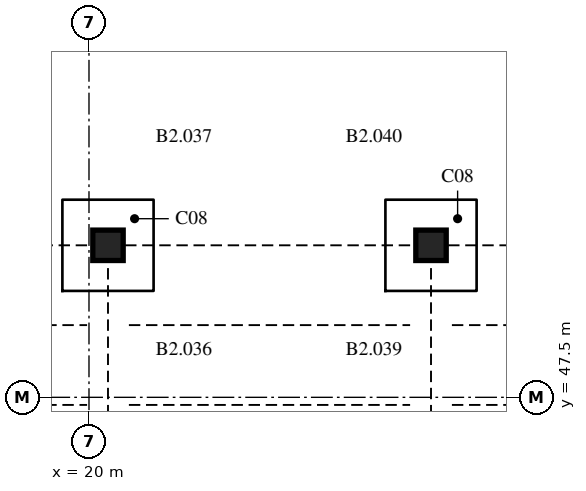
"""IFC4 building model, lengths in metres.
Left out: names, types, materials, properties, quantities, classifications, styles, units other than length and angle.
Written with IfcOpenShell. Run it as: python <this file> out.ifc"""

import sys

from ifc_helpers import new_model, si_unit, direction, frame, origin, origin_2d, place, context, subcontext, project, spatial, rectangle, extrude, element, save


model = new_model("IFC4")
c1 = context("Model", 3, precision=1e-05, world=origin(), true_north=direction((0.0, 1.0)))
c2 = subcontext(c1, "Body", "Model", "MODEL_VIEW")
j1 = project(units=[si_unit("LENGTHUNIT", "METRE"), si_unit("PLANEANGLEUNIT", "RADIAN")], contexts=[c1])
p1 = place(None, origin())
s1 = spatial("IfcSite", under=j1, at=p1, CompositionType="ELEMENT")
p2 = place(p1, origin())
s2 = spatial("IfcBuilding", under=s1, at=p2, CompositionType="ELEMENT")
p3 = place(p2, frame((0.0, 0.0, -7.5)))
s3 = spatial("IfcBuildingStorey", under=s2, at=p3, CompositionType="ELEMENT", Elevation=-7.5)
for number, where, z_axis, x_axis in (
    (1, (20.5, 51.5, -0.6), (0.0, 0.0, 1.0), (1.0, 0.0, 0.0)),
    (2, (29.0, 51.5, -0.6), (0.0, 0.0, 1.0), (1.0, 0.0, 0.0)),
):
    element("IfcColumn", number, at=place(p3, frame(where, z_axis=z_axis, x_axis=x_axis)), inside=s3, PredefinedType="COLUMN", context=c2, shape_type="SweptSolid", body=[
        extrude(rectangle(XDim=0.8, YDim=0.8, at=origin_2d()), origin(), (0.0, 0.0, 1.0), 4.1),
    ])
save(model, sys.argv[1])
